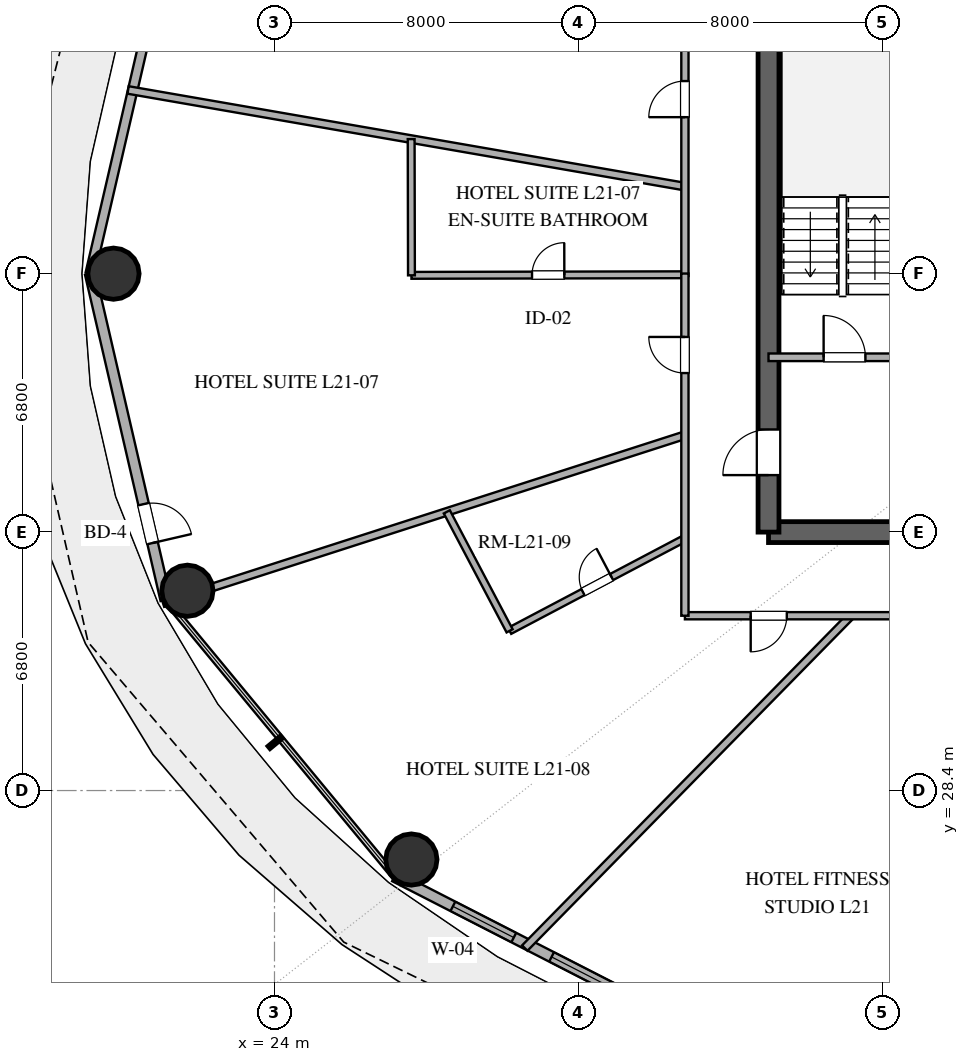
"""IFC4 building model, lengths in metres.
Left out: names, types, materials, properties, quantities, classifications, styles, units other than length and angle.
Written with IfcOpenShell. Run it as: python <this file> out.ifc"""

import sys

from ifc_helpers import new_model, si_unit, direction, frame, frame_2d, origin, origin_2d, place, context, subcontext, project, spatial, rectangle, hollow_circle, extrude, element, fill, save


model = new_model("IFC4")
c1 = context("Model", 3, precision=1e-05, world=origin(), true_north=direction((0.0, 1.0)))
c2 = subcontext(c1, "Body", "Model", "MODEL_VIEW")
j1 = project(units=[si_unit("LENGTHUNIT", "METRE"), si_unit("PLANEANGLEUNIT", "RADIAN")], contexts=[c1])
p1 = place(None, origin())
s1 = spatial("IfcSite", under=j1, at=p1, CompositionType="ELEMENT")
p2 = place(p1, origin())
s2 = spatial("IfcBuilding", under=s1, at=p2, CompositionType="ELEMENT")
p3 = place(p2, frame((0.0, 0.0, 87.6)))
s3 = spatial("IfcBuildingStorey", under=s2, at=p3, CompositionType="ELEMENT", Elevation=87.6)
p4 = place(p3, frame((37.0, 35.2, 0.0), z_axis=(0.0, 0.0, 1.0), x_axis=(1.0, 0.0, 0.0)))
e1 = element("IfcWall", 1, at=p4, inside=s3, PredefinedType="SHEAR", context=c2, shape_type="SweptSolid", body=[
    extrude(rectangle(XDim=4.0, YDim=0.55, at=frame_2d((2.0, 0.0))), origin(), (0.0, 0.0, 1.0), 3.38),
])
p5 = place(p3, frame((37.0, 35.2, 0.0), z_axis=(0.0, 0.0, 1.0), x_axis=(0.0, 1.0, 0.0)))
e2 = element("IfcWall", 2, at=p5, inside=s3, PredefinedType="SHEAR", context=c2, shape_type="SweptSolid", body=[
    extrude(rectangle(XDim=13.6, YDim=0.55, at=frame_2d((6.8, 0.0))), origin(), (0.0, 0.0, 1.0), 3.38),
])
p6 = place(p5, frame((1.5, 0.0, 0.0)))
e3 = element("IfcOpeningElement", 3, at=p6, cuts=e2, PredefinedType="OPENING", context=c2, shape_type="SweptSolid", body=[
    extrude(rectangle(XDim=1.2, YDim=2.15, at=frame_2d((0.6, 1.075))), frame((0.0, 0.285, 0.0), z_axis=(0.0, -1.0, 0.0), x_axis=(1.0, 0.0, 0.0)), (0.0, 0.0, 1.0), 0.57),
])
for number, where, z_axis, x_axis in (
    (4, (19.763, 42.0, 0.0), (0.0, 0.0, 1.0), (1.0, 0.0, 0.0)),
    (5, (21.709, 33.657, 0.0), (0.0, 0.0, 1.0), (1.0, 0.0, 0.0)),
    (6, (27.602, 26.585, 0.0), (0.0, 0.0, 1.0), (1.0, 0.0, 0.0)),
):
    element("IfcColumn", number, at=place(p3, frame(where, z_axis=z_axis, x_axis=x_axis)), inside=s3, PredefinedType="COLUMN", context=c2, shape_type="SweptSolid", body=[
        extrude(hollow_circle(Radius=0.675, WallThickness=0.036, at=origin_2d()), origin(), (0.0, 0.0, 1.0), 3.38),
    ])
p7 = place(p3, frame((21.139, 50.583, 0.0), z_axis=(0.0, 0.0, 1.0), x_axis=(-0.22558597182, -0.974223264616, 0.0)))
e7 = element("IfcWall", 7, at=p7, inside=s3, PredefinedType="SOLIDWALL", context=c2, shape_type="SweptSolid", body=[
    extrude(rectangle(XDim=8.811, YDim=0.25, at=frame_2d((4.405, 0.0))), origin(), (0.0, 0.0, 1.0), 3.38),
])
p8 = place(p3, frame((19.151, 42.0, 0.0), z_axis=(0.0, 0.0, 1.0), x_axis=(0.22558597182, -0.974223264616, 0.0)))
e8 = element("IfcWall", 8, at=p8, inside=s3, PredefinedType="SOLIDWALL", context=c2, shape_type="SweptSolid", body=[
    extrude(rectangle(XDim=8.811, YDim=0.28, at=frame_2d((4.405, 0.0))), origin(), (0.0, 0.0, 1.0), 3.38),
])
p9 = place(p8, frame((6.225, 0.0, 0.0)))
e9 = element("IfcOpeningElement", 9, at=p9, cuts=e8, PredefinedType="OPENING", context=c2, shape_type="SweptSolid", body=[
    extrude(rectangle(XDim=1.05, YDim=2.2, at=frame_2d((0.525, 1.1))), frame((0.0, 0.15, 0.0), z_axis=(0.0, -1.0, 0.0), x_axis=(1.0, 0.0, 0.0)), (0.0, 0.0, 1.0), 0.3),
])
p10 = place(p3, frame((27.16, 26.14, 0.0), z_axis=(0.0, 0.0, 1.0), x_axis=(0.889959505023, -0.45603955905, 0.0)))
e10 = element("IfcWall", 10, at=p10, inside=s3, PredefinedType="SOLIDWALL", context=c2, shape_type="SweptSolid", body=[
    extrude(rectangle(XDim=10.662, YDim=0.28, at=frame_2d((5.331, 0.0))), origin(), (0.0, 0.0, 1.0), 3.38),
])
p11 = place(p10, frame((1.724, 0.0, 0.85)))
e11 = element("IfcOpeningElement", 11, at=p11, cuts=e10, PredefinedType="OPENING", context=c2, shape_type="SweptSolid", body=[
    extrude(rectangle(XDim=1.8, YDim=2.2, at=frame_2d((0.9, 1.1))), frame((0.0, 0.15, 0.0), z_axis=(0.0, -1.0, 0.0), x_axis=(1.0, 0.0, 0.0)), (0.0, 0.0, 1.0), 0.3),
])
p12 = place(p10, frame((4.642, 0.0, 0.85)))
e12 = element("IfcOpeningElement", 12, at=p12, cuts=e10, PredefinedType="OPENING", context=c2, shape_type="SweptSolid", body=[
    extrude(rectangle(XDim=1.8, YDim=2.2, at=frame_2d((0.9, 1.1))), frame((0.0, 0.15, 0.0), z_axis=(0.0, -1.0, 0.0), x_axis=(1.0, 0.0, 0.0)), (0.0, 0.0, 1.0), 0.3),
])
p13 = place(p10, frame((6.927, 0.0, 0.85)))
e13 = element("IfcOpeningElement", 13, at=p13, cuts=e10, PredefinedType="OPENING", context=c2, shape_type="SweptSolid", body=[
    extrude(rectangle(XDim=1.8, YDim=2.2, at=frame_2d((0.9, 1.1))), frame((0.0, 0.15, 0.0), z_axis=(0.0, -1.0, 0.0), x_axis=(1.0, 0.0, 0.0)), (0.0, 0.0, 1.0), 0.3),
])
p14 = place(p3, frame((37.0, 39.8, 0.0), z_axis=(0.0, 0.0, 1.0), x_axis=(1.0, 0.0, 0.0)))
e14 = element("IfcWall", 14, at=p14, inside=s3, PredefinedType="SOLIDWALL", context=c2, shape_type="SweptSolid", body=[
    extrude(rectangle(XDim=4.0, YDim=0.2, at=frame_2d((2.0, 0.0))), origin(), (0.0, 0.0, 1.0), 2.74),
])
p15 = place(p14, frame((1.45, 0.0, 0.0)))
e15 = element("IfcOpeningElement", 15, at=p15, cuts=e14, PredefinedType="OPENING", context=c2, shape_type="SweptSolid", body=[
    extrude(rectangle(XDim=1.1, YDim=2.15, at=frame_2d((0.55, 1.075))), frame((0.0, 0.11, 0.0), z_axis=(0.0, -1.0, 0.0), x_axis=(1.0, 0.0, 0.0)), (0.0, 0.0, 1.0), 0.22),
])
p16 = place(p3, frame((39.167, 33.0, 0.0), z_axis=(0.0, 0.0, 1.0), x_axis=(-0.700440086719, -0.713711205542, 0.0)))
e16 = element("IfcWall", 16, at=p16, inside=s3, PredefinedType="PARTITIONING", context=c2, shape_type="SweptSolid", body=[
    extrude(rectangle(XDim=12.252, YDim=0.2, at=frame_2d((6.126, 0.0))), origin(), (0.0, 0.0, 1.0), 2.74),
])
p17 = place(p3, frame((34.8, 37.75, 0.0), z_axis=(0.0, 0.0, 1.0), x_axis=(-0.951880556228, -0.306469258939, 0.0)))
e17 = element("IfcWall", 17, at=p17, inside=s3, PredefinedType="PARTITIONING", context=c2, shape_type="SweptSolid", body=[
    extrude(rectangle(XDim=14.428, YDim=0.2, at=frame_2d((7.214, 0.0))), origin(), (0.0, 0.0, 1.0), 2.74),
])
p18 = place(p3, frame((34.8, 44.291, 0.0), z_axis=(0.0, 0.0, 1.0), x_axis=(-0.985271938133, 0.170994759944, 0.0)))
e18 = element("IfcWall", 18, at=p18, inside=s3, PredefinedType="PARTITIONING", context=c2, shape_type="SweptSolid", body=[
    extrude(rectangle(XDim=14.872, YDim=0.2, at=frame_2d((7.436, 0.0))), origin(), (0.0, 0.0, 1.0), 2.74),
])
p19 = place(p3, frame((27.604, 41.956, 0.0), z_axis=(0.0, 0.0, 1.0), x_axis=(0.999997715604, 0.002137472216, 0.0)))
e19 = element("IfcWall", 19, at=p19, inside=s3, PredefinedType="PLUMBINGWALL", context=c2, shape_type="SweptSolid", body=[
    extrude(rectangle(XDim=7.196, YDim=0.18, at=frame_2d((3.598, 0.0))), origin(), (0.0, 0.0, 1.0), 2.74),
])
p20 = place(p19, frame((3.173, 0.0, 0.0)))
e20 = element("IfcOpeningElement", 20, at=p20, cuts=e19, PredefinedType="OPENING", context=c2, shape_type="SweptSolid", body=[
    extrude(rectangle(XDim=0.85, YDim=2.1, at=frame_2d((0.425, 1.05))), frame((0.0, 0.1, 0.0), z_axis=(0.0, -1.0, 0.0), x_axis=(1.0, 0.0, 0.0)), (0.0, 0.0, 1.0), 0.2),
])
p21 = place(p3, frame((46.959, 33.0, 0.0), z_axis=(0.0, 0.0, 1.0), x_axis=(-1.0, 0.0, 0.0)))
e21 = element("IfcWall", 21, at=p21, inside=s3, PredefinedType="PARTITIONING", context=c2, shape_type="SweptSolid", body=[
    extrude(rectangle(XDim=12.159, YDim=0.19, at=frame_2d((6.08, 0.0))), origin(), (0.0, 0.0, 1.0), 2.74),
])
p22 = place(p21, frame((4.237, 0.0, 0.0)))
e22 = element("IfcOpeningElement", 22, at=p22, cuts=e21, PredefinedType="OPENING", context=c2, shape_type="SweptSolid", body=[
    extrude(rectangle(XDim=1.0, YDim=2.2, at=frame_2d((0.5, 1.1))), frame((0.0, 0.105, 0.0), z_axis=(0.0, -1.0, 0.0), x_axis=(1.0, 0.0, 0.0)), (0.0, 0.0, 1.0), 0.21),
])
p23 = place(p21, frame((9.478, 0.0, 0.0)))
e23 = element("IfcOpeningElement", 23, at=p23, cuts=e21, PredefinedType="OPENING", context=c2, shape_type="SweptSolid", body=[
    extrude(rectangle(XDim=0.95, YDim=2.15, at=frame_2d((0.475, 1.075))), frame((0.0, 0.105, 0.0), z_axis=(0.0, -1.0, 0.0), x_axis=(1.0, 0.0, 0.0)), (0.0, 0.0, 1.0), 0.21),
])
p24 = place(p3, frame((30.187, 32.602, 0.0), z_axis=(0.0, 0.0, 1.0), x_axis=(0.884469007168, 0.466598944877, 0.0)))
e24 = element("IfcWall", 24, at=p24, inside=s3, PredefinedType="PLUMBINGWALL", context=c2, shape_type="SweptSolid", body=[
    extrude(rectangle(XDim=5.216, YDim=0.18, at=frame_2d((2.608, 0.0))), origin(), (0.0, 0.0, 1.0), 2.74),
])
p25 = place(p24, frame((2.183, 0.0, 0.0)))
e25 = element("IfcOpeningElement", 25, at=p25, cuts=e24, PredefinedType="OPENING", context=c2, shape_type="SweptSolid", body=[
    extrude(rectangle(XDim=0.85, YDim=2.1, at=frame_2d((0.425, 1.05))), frame((0.0, 0.1, 0.0), z_axis=(0.0, -1.0, 0.0), x_axis=(1.0, 0.0, 0.0)), (0.0, 0.0, 1.0), 0.2),
])
p26 = place(p3, frame((34.8, 41.94, 0.0), z_axis=(0.0, 0.0, 1.0), x_axis=(0.0, 1.0, 0.0)))
e26 = element("IfcWall", 26, at=p26, inside=s3, PredefinedType="PARTITIONING", context=c2, shape_type="SweptSolid", body=[
    extrude(rectangle(XDim=9.06, YDim=0.19, at=frame_2d((4.53, 0.0))), origin(), (0.0, 0.0, 1.0), 2.74),
])
p27 = place(p26, frame((4.179, 0.0, 0.0)))
e27 = element("IfcOpeningElement", 27, at=p27, cuts=e26, PredefinedType="OPENING", context=c2, shape_type="SweptSolid", body=[
    extrude(rectangle(XDim=0.95, YDim=2.15, at=frame_2d((0.475, 1.075))), frame((0.0, 0.105, 0.0), z_axis=(0.0, -1.0, 0.0), x_axis=(1.0, 0.0, 0.0)), (0.0, 0.0, 1.0), 0.21),
])
p28 = place(p3, frame((34.8, 33.0, 0.0), z_axis=(0.0, 0.0, 1.0), x_axis=(0.0, 1.0, 0.0)))
e28 = element("IfcWall", 28, at=p28, inside=s3, PredefinedType="PARTITIONING", context=c2, shape_type="SweptSolid", body=[
    extrude(rectangle(XDim=9.004, YDim=0.19, at=frame_2d((4.502, 0.0))), origin(), (0.0, 0.0, 1.0), 2.74),
])
p29 = place(p28, frame((6.385, 0.0, 0.0)))
e29 = element("IfcOpeningElement", 29, at=p29, cuts=e28, PredefinedType="OPENING", context=c2, shape_type="SweptSolid", body=[
    extrude(rectangle(XDim=0.95, YDim=2.15, at=frame_2d((0.475, 1.075))), frame((0.0, 0.105, 0.0), z_axis=(0.0, -1.0, 0.0), x_axis=(1.0, 0.0, 0.0)), (0.0, 0.0, 1.0), 0.21),
])
p30 = place(p3, frame((27.596, 45.541, 0.0), z_axis=(0.0, 0.0, 1.0), x_axis=(0.002179237538, -0.999997625459, 0.0)))
e30 = element("IfcWall", 30, at=p30, inside=s3, PredefinedType="PLUMBINGWALL", context=c2, shape_type="SweptSolid", body=[
    extrude(rectangle(XDim=3.585, YDim=0.18, at=frame_2d((1.792, 0.0))), origin(), (0.0, 0.0, 1.0), 2.74),
])
p31 = place(p3, frame((28.535, 35.733, 0.0), z_axis=(0.0, 0.0, 1.0), x_axis=(0.466638742987, -0.884448010651, 0.0)))
e31 = element("IfcWall", 31, at=p31, inside=s3, PredefinedType="PLUMBINGWALL", context=c2, shape_type="SweptSolid", body=[
    extrude(rectangle(XDim=3.54, YDim=0.18, at=frame_2d((1.77, 0.0))), origin(), (0.0, 0.0, 1.0), 2.74),
])
p32 = place(p9, origin())
e32 = element("IfcDoor", 32, at=p32, inside=s3, OperationType="SINGLE_SWING_RIGHT", PredefinedType="DOOR", context=c2, shape_type="SweptSolid", body=[
    extrude(rectangle(XDim=1.05, YDim=2.2, at=frame_2d((0.525, 1.1))), frame((0.0, 0.025, 0.0), z_axis=(0.0, -1.0, 0.0), x_axis=(1.0, 0.0, 0.0)), (0.0, 0.0, 1.0), 0.05),
])
fill(e9, e32)
p33 = place(p11, origin())
e33 = element("IfcWindow", 33, at=p33, inside=s3, PartitioningType="SINGLE_PANEL", PredefinedType="WINDOW", context=c2, shape_type="SweptSolid", body=[
    extrude(rectangle(XDim=1.8, YDim=2.2, at=frame_2d((0.9, 1.1))), frame((0.0, 0.03, 0.0), z_axis=(0.0, -1.0, 0.0), x_axis=(1.0, 0.0, 0.0)), (0.0, 0.0, 1.0), 0.06),
])
fill(e11, e33)
p34 = place(p12, origin())
e34 = element("IfcWindow", 34, at=p34, inside=s3, PartitioningType="SINGLE_PANEL", PredefinedType="WINDOW", context=c2, shape_type="SweptSolid", body=[
    extrude(rectangle(XDim=1.8, YDim=2.2, at=frame_2d((0.9, 1.1))), frame((0.0, 0.03, 0.0), z_axis=(0.0, -1.0, 0.0), x_axis=(1.0, 0.0, 0.0)), (0.0, 0.0, 1.0), 0.06),
])
fill(e12, e34)
p35 = place(p6, origin())
e35 = element("IfcDoor", 35, at=p35, inside=s3, OperationType="SINGLE_SWING_LEFT", PredefinedType="DOOR", context=c2, shape_type="SweptSolid", body=[
    extrude(rectangle(XDim=1.2, YDim=2.15, at=frame_2d((0.6, 1.075))), frame((0.0, 0.025, 0.0), z_axis=(0.0, -1.0, 0.0), x_axis=(1.0, 0.0, 0.0)), (0.0, 0.0, 1.0), 0.05),
])
fill(e3, e35)
p36 = place(p15, origin())
e36 = element("IfcDoor", 36, at=p36, inside=s3, OperationType="SINGLE_SWING_LEFT", PredefinedType="DOOR", context=c2, shape_type="SweptSolid", body=[
    extrude(rectangle(XDim=1.1, YDim=2.15, at=frame_2d((0.55, 1.075))), frame((0.0, 0.025, 0.0), z_axis=(0.0, -1.0, 0.0), x_axis=(1.0, 0.0, 0.0)), (0.0, 0.0, 1.0), 0.05),
])
fill(e15, e36)
p37 = place(p20, origin())
e37 = element("IfcDoor", 37, at=p37, inside=s3, OperationType="SINGLE_SWING_RIGHT", PredefinedType="DOOR", context=c2, shape_type="SweptSolid", body=[
    extrude(rectangle(XDim=0.85, YDim=2.1, at=frame_2d((0.425, 1.05))), frame((0.0, 0.025, 0.0), z_axis=(0.0, -1.0, 0.0), x_axis=(1.0, 0.0, 0.0)), (0.0, 0.0, 1.0), 0.05),
])
fill(e20, e37)
p38 = place(p23, origin())
e38 = element("IfcDoor", 38, at=p38, inside=s3, OperationType="SINGLE_SWING_RIGHT", PredefinedType="DOOR", context=c2, shape_type="SweptSolid", body=[
    extrude(rectangle(XDim=0.95, YDim=2.15, at=frame_2d((0.475, 1.075))), frame((0.0, 0.025, 0.0), z_axis=(0.0, -1.0, 0.0), x_axis=(1.0, 0.0, 0.0)), (0.0, 0.0, 1.0), 0.05),
])
fill(e23, e38)
p39 = place(p25, origin())
e39 = element("IfcDoor", 39, at=p39, inside=s3, OperationType="SINGLE_SWING_RIGHT", PredefinedType="DOOR", context=c2, shape_type="SweptSolid", body=[
    extrude(rectangle(XDim=0.85, YDim=2.1, at=frame_2d((0.425, 1.05))), frame((0.0, 0.025, 0.0), z_axis=(0.0, -1.0, 0.0), x_axis=(1.0, 0.0, 0.0)), (0.0, 0.0, 1.0), 0.05),
])
fill(e25, e39)
p40 = place(p27, origin())
e40 = element("IfcDoor", 40, at=p40, inside=s3, OperationType="SINGLE_SWING_LEFT", PredefinedType="DOOR", context=c2, shape_type="SweptSolid", body=[
    extrude(rectangle(XDim=0.95, YDim=2.15, at=frame_2d((0.475, 1.075))), frame((0.0, 0.025, 0.0), z_axis=(0.0, -1.0, 0.0), x_axis=(1.0, 0.0, 0.0)), (0.0, 0.0, 1.0), 0.05),
])
fill(e27, e40)
p41 = place(p29, origin())
e41 = element("IfcDoor", 41, at=p41, inside=s3, OperationType="SINGLE_SWING_RIGHT", PredefinedType="DOOR", context=c2, shape_type="SweptSolid", body=[
    extrude(rectangle(XDim=0.95, YDim=2.15, at=frame_2d((0.475, 1.075))), frame((0.0, 0.025, 0.0), z_axis=(0.0, -1.0, 0.0), x_axis=(1.0, 0.0, 0.0)), (0.0, 0.0, 1.0), 0.05),
])
fill(e29, e41)
save(model, sys.argv[1])
